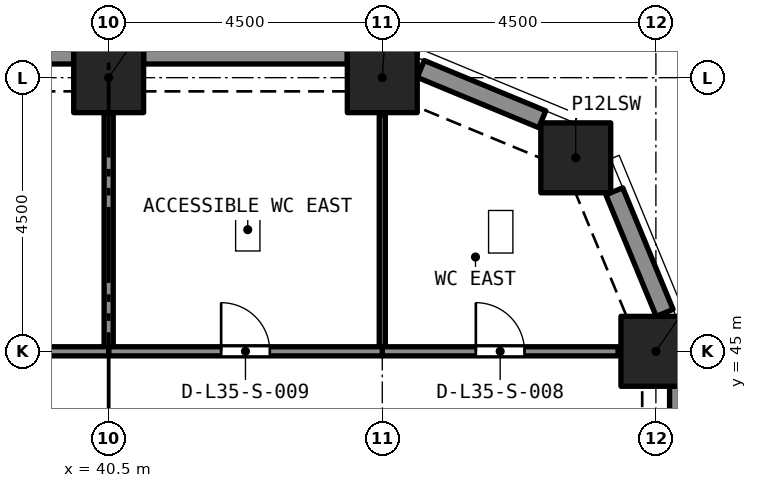
"""IFC4 building model, lengths in metres.
Left out: names, types, materials, properties, quantities, classifications, styles, units other than length and angle.
Written with IfcOpenShell. Run it as: python <this file> out.ifc"""

import sys

from ifc_helpers import new_model, si_unit, direction, frame, frame_2d, origin, origin_2d, place, context, subcontext, project, spatial, rectangle, extrude, element, fill, save


model = new_model("IFC4")
c1 = context("Model", 3, precision=1e-05, world=origin(), true_north=direction((0.0, 1.0)))
c2 = subcontext(c1, "Body", "Model", "MODEL_VIEW")
j1 = project(units=[si_unit("LENGTHUNIT", "METRE"), si_unit("PLANEANGLEUNIT", "RADIAN")], contexts=[c1])
p1 = place(None, origin())
s1 = spatial("IfcSite", under=j1, at=p1, CompositionType="ELEMENT")
p2 = place(p1, origin())
s2 = spatial("IfcBuilding", under=s1, at=p2, CompositionType="ELEMENT")
p3 = place(p2, frame((0.0, 0.0, 124.8)))
s3 = spatial("IfcBuildingStorey", under=s2, at=p3, CompositionType="ELEMENT", Elevation=124.8)
for number, where, z_axis, x_axis in (
    (1, (49.5, 45.0, 0.0), (0.0, 0.0, 1.0), (1.0, 0.0, 0.0)),
    (2, (48.182, 48.182, 0.0), (0.0, 0.0, 1.0), (1.0, 0.0, 0.0)),
    (3, (40.5, 49.5, 0.0), (0.0, 0.0, 1.0), (1.0, 0.0, 0.0)),
    (4, (45.0, 49.5, 0.0), (0.0, 0.0, 1.0), (1.0, 0.0, 0.0)),
):
    element("IfcColumn", number, at=place(p3, frame(where, z_axis=z_axis, x_axis=x_axis)), inside=s3, PredefinedType="COLUMN", context=c2, shape_type="SweptSolid", body=[
        extrude(rectangle(XDim=1.15, YDim=1.15, at=origin_2d()), origin(), (0.0, 0.0, 1.0), 5.4),
    ])
p4 = place(p3, frame((49.875, 44.425, 0.0), z_axis=(0.0, 0.0, 1.0), x_axis=(0.0, -1.0, 0.0)))
e5 = element("IfcWall", 5, at=p4, inside=s3, PredefinedType="SOLIDWALL", context=c2, shape_type="SweptSolid", body=[
    extrude(rectangle(XDim=3.35, YDim=0.3, at=frame_2d((1.675, 0.0))), origin(), (0.0, 0.0, 1.0), 5.4),
])
for number, where, z_axis, x_axis in (
    (6, (48.816, 47.631, 0.0), (0.0, 0.0, 1.0), (0.383, -0.924, 0.0)),
    (7, (45.632, 49.644, 0.0), (0.0, 0.0, 1.0), (0.924, -0.383, 0.0)),
):
    element("IfcWall", number, at=place(p3, frame(where, z_axis=z_axis, x_axis=x_axis)), inside=s3, PredefinedType="SOLIDWALL", context=c2, shape_type="SweptSolid", body=[
        extrude(rectangle(XDim=2.164, YDim=0.3, at=frame_2d((1.082, 0.0))), origin(), (0.0, 0.0, 1.0), 5.4),
    ])
for number, where, z_axis, x_axis in (
    (8, (41.075, 49.875, 0.0), (0.0, 0.0, 1.0), (1.0, 0.0, 0.0)),
    (9, (36.575, 49.875, 0.0), (0.0, 0.0, 1.0), (1.0, 0.0, 0.0)),
):
    element("IfcWall", number, at=place(p3, frame(where, z_axis=z_axis, x_axis=x_axis)), inside=s3, PredefinedType="SOLIDWALL", context=c2, shape_type="SweptSolid", body=[
        extrude(rectangle(XDim=3.35, YDim=0.3, at=frame_2d((1.675, 0.0))), origin(), (0.0, 0.0, 1.0), 5.4),
    ])
p5 = place(p3, frame((45.0, 45.075, 0.0), z_axis=(0.0, 0.0, 1.0), x_axis=(0.0, 1.0, 0.0)))
e10 = element("IfcWall", 10, at=p5, inside=s3, PredefinedType="PARTITIONING", context=c2, shape_type="SweptSolid", body=[
    extrude(rectangle(XDim=3.803, YDim=0.1, at=frame_2d((1.901, 0.0))), origin(), (0.0, 0.0, 1.0), 5.1),
])
p6 = place(p3, frame((45.0, 45.0, 0.0), z_axis=(0.0, 0.0, 1.0), x_axis=(1.0, 0.0, 0.0)))
e11 = element("IfcWall", 11, at=p6, inside=s3, PredefinedType="PARTITIONING", context=c2, shape_type="SweptSolid", body=[
    extrude(rectangle(XDim=3.878, YDim=0.15, at=frame_2d((1.939, 0.0))), origin(), (0.0, 0.0, 1.0), 5.1),
])
p7 = place(p6, frame((1.539, 0.0, 0.0)))
e12 = element("IfcOpeningElement", 12, at=p7, cuts=e11, PredefinedType="OPENING", context=c2, shape_type="SweptSolid", body=[
    extrude(rectangle(XDim=0.8, YDim=2.1, at=frame_2d((0.4, 1.05))), frame((0.0, 0.085, 0.0), z_axis=(0.0, -1.0, 0.0), x_axis=(1.0, 0.0, 0.0)), (0.0, 0.0, 1.0), 0.17),
])
p8 = place(p3, frame((40.5, 45.075, 0.0), z_axis=(0.0, 0.0, 1.0), x_axis=(0.0, 1.0, 0.0)))
e13 = element("IfcWall", 13, at=p8, inside=s3, PredefinedType="PARTITIONING", context=c2, shape_type="SweptSolid", body=[
    extrude(rectangle(XDim=3.85, YDim=0.15, at=frame_2d((1.925, 0.0))), origin(), (0.0, 0.0, 1.0), 5.1),
])
p9 = place(p3, frame((40.5, 45.0, 0.0), z_axis=(0.0, 0.0, 1.0), x_axis=(1.0, 0.0, 0.0)))
e14 = element("IfcWall", 14, at=p9, inside=s3, PredefinedType="PARTITIONING", context=c2, shape_type="SweptSolid", body=[
    extrude(rectangle(XDim=4.5, YDim=0.15, at=frame_2d((2.25, 0.0))), origin(), (0.0, 0.0, 1.0), 5.1),
])
p10 = place(p9, frame((1.85, 0.0, 0.0)))
e15 = element("IfcOpeningElement", 15, at=p10, cuts=e14, PredefinedType="OPENING", context=c2, shape_type="SweptSolid", body=[
    extrude(rectangle(XDim=0.8, YDim=2.1, at=frame_2d((0.4, 1.05))), frame((0.0, 0.085, 0.0), z_axis=(0.0, -1.0, 0.0), x_axis=(1.0, 0.0, 0.0)), (0.0, 0.0, 1.0), 0.17),
])
p11 = place(p3, frame((36.0, 45.0, 0.0), z_axis=(0.0, 0.0, 1.0), x_axis=(1.0, 0.0, 0.0)))
e16 = element("IfcWall", 16, at=p11, inside=s3, PredefinedType="PARTITIONING", context=c2, shape_type="SweptSolid", body=[
    extrude(rectangle(XDim=4.5, YDim=0.15, at=frame_2d((2.25, 0.0))), origin(), (0.0, 0.0, 1.0), 5.1),
])
p12 = place(p11, frame((1.75, 0.0, 0.0)))
e17 = element("IfcOpeningElement", 17, at=p12, cuts=e16, PredefinedType="OPENING", context=c2, shape_type="SweptSolid", body=[
    extrude(rectangle(XDim=1.0, YDim=2.1, at=frame_2d((0.5, 1.05))), frame((0.0, 0.085, 0.0), z_axis=(0.0, -1.0, 0.0), x_axis=(1.0, 0.0, 0.0)), (0.0, 0.0, 1.0), 0.17),
])
p13 = place(p7, origin())
e18 = element("IfcDoor", 18, at=p13, inside=s3, OperationType="SINGLE_SWING_RIGHT", PredefinedType="DOOR", context=c2, shape_type="SweptSolid", body=[
    extrude(rectangle(XDim=0.8, YDim=2.1, at=frame_2d((0.4, 1.05))), frame((0.0, 0.025, 0.0), z_axis=(0.0, -1.0, 0.0), x_axis=(1.0, 0.0, 0.0)), (0.0, 0.0, 1.0), 0.05),
])
fill(e12, e18)
p14 = place(p10, origin())
e19 = element("IfcDoor", 19, at=p14, inside=s3, OperationType="SINGLE_SWING_RIGHT", PredefinedType="DOOR", context=c2, shape_type="SweptSolid", body=[
    extrude(rectangle(XDim=0.8, YDim=2.1, at=frame_2d((0.4, 1.05))), frame((0.0, 0.025, 0.0), z_axis=(0.0, -1.0, 0.0), x_axis=(1.0, 0.0, 0.0)), (0.0, 0.0, 1.0), 0.05),
])
fill(e15, e19)
save(model, sys.argv[1])
